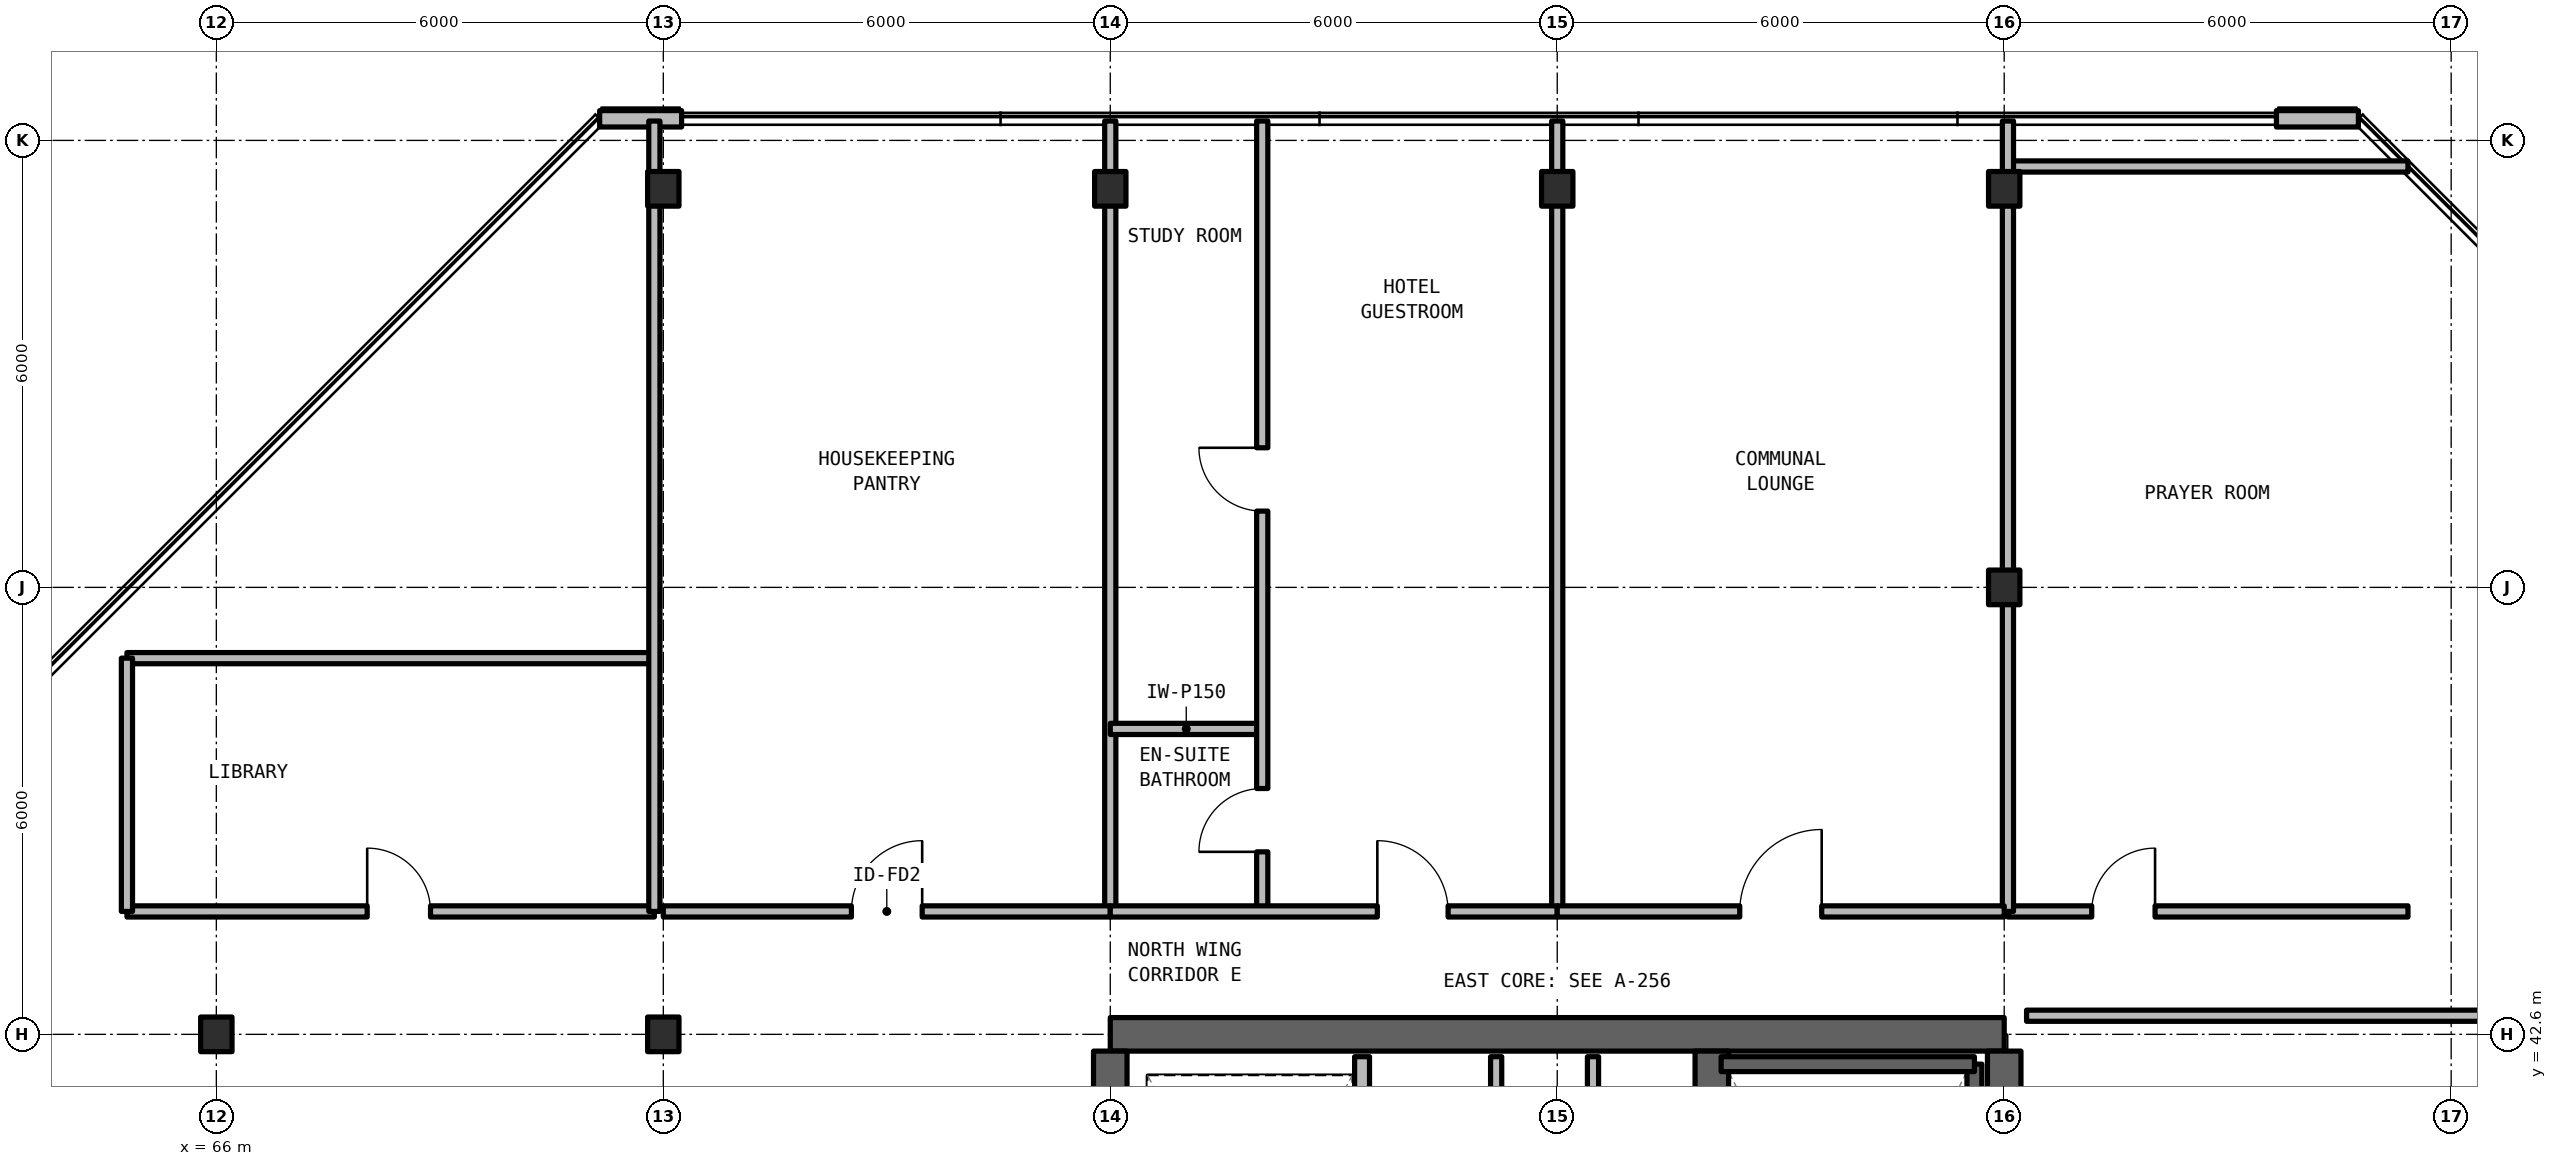
"""IFC4 building model, lengths in metres.
Left out: names, types, materials, properties, quantities, classifications, styles, units other than length and angle.
Written with IfcOpenShell. Run it as: python <this file> out.ifc"""

import sys

from ifc_helpers import new_model, si_unit, direction, frame, frame_2d, origin, origin_2d, place, context, subcontext, project, spatial, rectangle, i_section, extrude, element, fill, save


model = new_model("IFC4")
c1 = context("Model", 3, precision=1e-05, world=origin(), true_north=direction((0.0, 1.0)))
c2 = subcontext(c1, "Body", "Model", "MODEL_VIEW")
j1 = project(units=[si_unit("LENGTHUNIT", "METRE"), si_unit("PLANEANGLEUNIT", "RADIAN")], contexts=[c1])
p1 = place(None, origin())
s1 = spatial("IfcSite", under=j1, at=p1, CompositionType="ELEMENT")
p2 = place(p1, origin())
s2 = spatial("IfcBuilding", under=s1, at=p2, CompositionType="ELEMENT")
p3 = place(p2, frame((0.0, 0.0, 264.33)))
s3 = spatial("IfcBuildingStorey", under=s2, at=p3, CompositionType="ELEMENT", Elevation=264.33)
p4 = place(p3, frame((90.0, 42.6, 0.0), z_axis=(0.0, 0.0, 1.0), x_axis=(-1.0, 0.0, 0.0)))
e1 = element("IfcWall", 1, at=p4, inside=s3, PredefinedType="SHEAR", context=c2, shape_type="SweptSolid", body=[
    extrude(rectangle(XDim=12.0, YDim=0.45, at=frame_2d((6.0, 0.0))), origin(), (0.0, 0.0, 1.0), 3.63),
])
p5 = place(p3, frame((90.0, 24.825, 0.0), z_axis=(0.0, 0.0, 1.0), x_axis=(0.0, 1.0, 0.0)))
e2 = element("IfcWall", 2, at=p5, inside=s3, PredefinedType="SHEAR", context=c2, shape_type="SweptSolid", body=[
    extrude(rectangle(XDim=17.55, YDim=0.45, at=frame_2d((8.775, 0.0))), origin(), (0.0, 0.0, 1.0), 3.63),
])
p6 = place(p3, frame((78.0, 36.8, 0.0), z_axis=(0.0, 0.0, 1.0), x_axis=(0.0, 1.0, 0.0)))
e3 = element("IfcWall", 3, at=p6, inside=s3, PredefinedType="SHEAR", context=c2, shape_type="SweptSolid", body=[
    extrude(rectangle(XDim=5.575, YDim=0.45, at=frame_2d((2.788, 0.0))), origin(), (0.0, 0.0, 1.0), 3.63),
])
p7 = place(p3, frame((86.075, 24.825, 0.0), z_axis=(0.0, 0.0, 1.0), x_axis=(0.0, 1.0, 0.0)))
e4 = element("IfcWall", 4, at=p7, inside=s3, PredefinedType="SHEAR", context=c2, shape_type="SweptSolid", body=[
    extrude(rectangle(XDim=17.55, YDim=0.45, at=frame_2d((8.775, 0.0))), origin(), (0.0, 0.0, 1.0), 3.63),
])
p8 = place(p7, frame((0.425, 0.0, 0.0)))
e5 = element("IfcOpeningElement", 5, at=p8, cuts=e4, PredefinedType="OPENING", context=c2, shape_type="SweptSolid", body=[
    extrude(rectangle(XDim=1.15, YDim=2.15, at=frame_2d((0.575, 1.075))), frame((0.0, 0.235, 0.0), z_axis=(0.0, -1.0, 0.0), x_axis=(1.0, 0.0, 0.0)), (0.0, 0.0, 1.0), 0.47),
])
p9 = place(p7, frame((9.625, 0.0, 0.0)))
e6 = element("IfcOpeningElement", 6, at=p9, cuts=e4, PredefinedType="OPENING", context=c2, shape_type="SweptSolid", body=[
    extrude(rectangle(XDim=1.15, YDim=2.15, at=frame_2d((0.575, 1.075))), frame((0.0, 0.235, 0.0), z_axis=(0.0, -1.0, 0.0), x_axis=(1.0, 0.0, 0.0)), (0.0, 0.0, 1.0), 0.47),
])
for number, where, z_axis, x_axis in (
    (7, (66.0, 42.6, 0.0), (0.0, 0.0, 1.0), (1.0, 0.0, 0.0)),
    (8, (72.0, 42.6, 0.0), (0.0, 0.0, 1.0), (1.0, 0.0, 0.0)),
    (9, (90.0, 48.6, 0.0), (0.0, 0.0, 1.0), (1.0, 0.0, 0.0)),
    (10, (72.0, 53.95, 0.0), (0.0, 0.0, 1.0), (1.0, 0.0, 0.0)),
    (11, (78.0, 53.95, 0.0), (0.0, 0.0, 1.0), (1.0, 0.0, 0.0)),
    (12, (84.0, 53.95, 0.0), (0.0, 0.0, 1.0), (1.0, 0.0, 0.0)),
    (13, (90.0, 53.95, 0.0), (0.0, 0.0, 1.0), (1.0, 0.0, 0.0)),
):
    element("IfcColumn", number, at=place(p3, frame(where, z_axis=z_axis, x_axis=x_axis)), inside=s3, PredefinedType="COLUMN", context=c2, shape_type="SweptSolid", body=[
        extrude(i_section(OverallWidth=0.421, OverallDepth=0.465, WebThickness=0.045, FlangeThickness=0.07, FilletRadius=0.015, at=origin_2d()), origin(), (0.0, 0.0, 1.0), 3.63),
    ])
for number, where, z_axis, x_axis in (
    (14, (94.754, 54.89, 0.0), (0.0, 0.0, 1.0), (-1.0, 0.0, 0.0)),
    (15, (72.246, 54.89, 0.0), (0.0, 0.0, 1.0), (-1.0, 0.0, 0.0)),
):
    element("IfcWall", number, at=place(p3, frame(where, z_axis=z_axis, x_axis=x_axis)), inside=s3, PredefinedType="SOLIDWALL", context=c2, shape_type="SweptSolid", body=[
        extrude(rectangle(XDim=1.1, YDim=0.22, at=frame_2d((0.55, 0.0))), origin(), (0.0, 0.0, 1.0), 3.41),
    ])
p10 = place(p3, frame((84.48, 36.88, 0.0), z_axis=(0.0, 0.0, 1.0), x_axis=(0.0, 1.0, 0.0)))
e16 = element("IfcWall", 16, at=p10, inside=s3, PredefinedType="SOLIDWALL", context=c2, shape_type="SweptSolid", body=[
    extrude(rectangle(XDim=5.42, YDim=0.15, at=frame_2d((2.71, 0.0))), origin(), (0.0, 0.0, 1.0), 2.63),
])
p11 = place(p3, frame((83.18, 36.88, 0.0), z_axis=(0.0, 0.0, 1.0), x_axis=(0.0, 1.0, 0.0)))
e17 = element("IfcWall", 17, at=p11, inside=s3, PredefinedType="SOLIDWALL", context=c2, shape_type="SweptSolid", body=[
    extrude(rectangle(XDim=5.42, YDim=0.15, at=frame_2d((2.71, 0.0))), origin(), (0.0, 0.0, 1.0), 2.63),
])
p12 = place(p11, frame((2.1, 0.0, 0.0)))
e18 = element("IfcOpeningElement", 18, at=p12, cuts=e17, PredefinedType="OPENING", context=c2, shape_type="SweptSolid", body=[
    extrude(rectangle(XDim=0.95, YDim=2.15, at=frame_2d((0.475, 1.075))), frame((0.0, 0.085, 0.0), z_axis=(0.0, -1.0, 0.0), x_axis=(1.0, 0.0, 0.0)), (0.0, 0.0, 1.0), 0.17),
])
p13 = place(p3, frame((81.38, 36.88, 0.0), z_axis=(0.0, 0.0, 1.0), x_axis=(0.0, 1.0, 0.0)))
e19 = element("IfcWall", 19, at=p13, inside=s3, PredefinedType="SOLIDWALL", context=c2, shape_type="SweptSolid", body=[
    extrude(rectangle(XDim=5.42, YDim=0.2, at=frame_2d((2.71, 0.0))), origin(), (0.0, 0.0, 1.0), 2.63),
])
p14 = place(p13, frame((0.8, 0.0, 0.0)))
e20 = element("IfcOpeningElement", 20, at=p14, cuts=e19, PredefinedType="OPENING", context=c2, shape_type="SweptSolid", body=[
    extrude(rectangle(XDim=1.1, YDim=2.2, at=frame_2d((0.55, 1.1))), frame((0.0, 0.11, 0.0), z_axis=(0.0, -1.0, 0.0), x_axis=(1.0, 0.0, 0.0)), (0.0, 0.0, 1.0), 0.22),
])
p15 = place(p13, frame((3.3, 0.0, 0.0)))
e21 = element("IfcOpeningElement", 21, at=p15, cuts=e19, PredefinedType="OPENING", context=c2, shape_type="SweptSolid", body=[
    extrude(rectangle(XDim=1.1, YDim=2.2, at=frame_2d((0.55, 1.1))), frame((0.0, 0.11, 0.0), z_axis=(0.0, -1.0, 0.0), x_axis=(1.0, 0.0, 0.0)), (0.0, 0.0, 1.0), 0.22),
])
p16 = place(p3, frame((64.8, 44.25, 0.0), z_axis=(0.0, 0.0, 1.0), x_axis=(1.0, 0.0, 0.0)))
e22 = element("IfcWall", 22, at=p16, inside=s3, PredefinedType="SOLIDWALL", context=c2, shape_type="SweptSolid", body=[
    extrude(rectangle(XDim=7.08, YDim=0.15, at=frame_2d((3.54, 0.0))), origin(), (0.0, 0.0, 1.0), 2.63),
])
p17 = place(p16, frame((3.225, 0.0, 0.0)))
e23 = element("IfcOpeningElement", 23, at=p17, cuts=e22, PredefinedType="OPENING", context=c2, shape_type="SweptSolid", body=[
    extrude(rectangle(XDim=0.85, YDim=2.1, at=frame_2d((0.425, 1.05))), frame((0.0, 0.085, 0.0), z_axis=(0.0, -1.0, 0.0), x_axis=(1.0, 0.0, 0.0)), (0.0, 0.0, 1.0), 0.17),
])
p18 = place(p3, frame((64.8, 47.65, 0.0), z_axis=(0.0, 0.0, 1.0), x_axis=(1.0, 0.0, 0.0)))
e24 = element("IfcWall", 24, at=p18, inside=s3, PredefinedType="SOLIDWALL", context=c2, shape_type="SweptSolid", body=[
    extrude(rectangle(XDim=7.08, YDim=0.15, at=frame_2d((3.54, 0.0))), origin(), (0.0, 0.0, 1.0), 2.63),
])
p19 = place(p3, frame((64.8, 44.25, 0.0), z_axis=(0.0, 0.0, 1.0), x_axis=(0.0, 1.0, 0.0)))
e25 = element("IfcWall", 25, at=p19, inside=s3, PredefinedType="SOLIDWALL", context=c2, shape_type="SweptSolid", body=[
    extrude(rectangle(XDim=3.4, YDim=0.15, at=frame_2d((1.7, 0.0))), origin(), (0.0, 0.0, 1.0), 2.63),
])
p20 = place(p3, frame((71.88, 44.25, 0.0), z_axis=(0.0, 0.0, 1.0), x_axis=(0.0, 1.0, 0.0)))
e26 = element("IfcWall", 26, at=p20, inside=s3, PredefinedType="SOLIDWALL", context=c2, shape_type="SweptSolid", body=[
    extrude(rectangle(XDim=10.61, YDim=0.15, at=frame_2d((5.305, 0.0))), origin(), (0.0, 0.0, 1.0), 2.63),
])
p21 = place(p3, frame((90.3, 42.85, 0.0), z_axis=(0.0, 0.0, 1.0), x_axis=(1.0, 0.0, 0.0)))
e27 = element("IfcWall", 27, at=p21, inside=s3, PredefinedType="SOLIDWALL", context=c2, shape_type="SweptSolid", body=[
    extrude(rectangle(XDim=8.52, YDim=0.15, at=frame_2d((4.26, 0.0))), origin(), (0.0, 0.0, 1.0), 2.63),
])
p22 = place(p3, frame((90.05, 44.25, 0.0), z_axis=(0.0, 0.0, 1.0), x_axis=(1.0, 0.0, 0.0)))
e28 = element("IfcWall", 28, at=p22, inside=s3, PredefinedType="SOLIDWALL", context=c2, shape_type="SweptSolid", body=[
    extrude(rectangle(XDim=5.37, YDim=0.15, at=frame_2d((2.685, 0.0))), origin(), (0.0, 0.0, 1.0), 2.63),
])
p23 = place(p22, frame((1.125, 0.0, 0.0)))
e29 = element("IfcOpeningElement", 29, at=p23, cuts=e28, PredefinedType="OPENING", context=c2, shape_type="SweptSolid", body=[
    extrude(rectangle(XDim=0.85, YDim=2.1, at=frame_2d((0.425, 1.05))), frame((0.0, 0.085, 0.0), z_axis=(0.0, -1.0, 0.0), x_axis=(1.0, 0.0, 0.0)), (0.0, 0.0, 1.0), 0.17),
])
p24 = place(p3, frame((90.05, 54.25, 0.0), z_axis=(0.0, 0.0, 1.0), x_axis=(1.0, 0.0, 0.0)))
e30 = element("IfcWall", 30, at=p24, inside=s3, PredefinedType="SOLIDWALL", context=c2, shape_type="SweptSolid", body=[
    extrude(rectangle(XDim=5.37, YDim=0.15, at=frame_2d((2.685, 0.0))), origin(), (0.0, 0.0, 1.0), 2.63),
])
for number, where, z_axis, x_axis in (
    (31, (90.05, 44.25, 0.0), (0.0, 0.0, 1.0), (0.0, 1.0, 0.0)),
    (32, (78.0, 44.25, 0.0), (0.0, 0.0, 1.0), (0.0, 1.0, 0.0)),
):
    element("IfcWall", number, at=place(p3, frame(where, z_axis=z_axis, x_axis=x_axis)), inside=s3, PredefinedType="SOLIDWALL", context=c2, shape_type="SweptSolid", body=[
        extrude(rectangle(XDim=10.61, YDim=0.15, at=frame_2d((5.305, 0.0))), origin(), (0.0, 0.0, 1.0), 2.63),
    ])
p25 = place(p3, frame((72.0, 44.25, 0.0), z_axis=(0.0, 0.0, 1.0), x_axis=(1.0, 0.0, 0.0)))
e33 = element("IfcWall", 33, at=p25, inside=s3, PredefinedType="SOLIDWALL", context=c2, shape_type="SweptSolid", body=[
    extrude(rectangle(XDim=6.0, YDim=0.15, at=frame_2d((3.0, 0.0))), origin(), (0.0, 0.0, 1.0), 2.63),
])
p26 = place(p25, frame((2.525, 0.0, 0.0)))
e34 = element("IfcOpeningElement", 34, at=p26, cuts=e33, PredefinedType="OPENING", context=c2, shape_type="SweptSolid", body=[
    extrude(rectangle(XDim=0.95, YDim=2.15, at=frame_2d((0.475, 1.075))), frame((0.0, 0.085, 0.0), z_axis=(0.0, -1.0, 0.0), x_axis=(1.0, 0.0, 0.0)), (0.0, 0.0, 1.0), 0.17),
])
p27 = place(p3, frame((84.0, 44.25, 0.0), z_axis=(0.0, 0.0, 1.0), x_axis=(0.0, 1.0, 0.0)))
e35 = element("IfcWall", 35, at=p27, inside=s3, PredefinedType="SOLIDWALL", context=c2, shape_type="SweptSolid", body=[
    extrude(rectangle(XDim=10.61, YDim=0.15, at=frame_2d((5.305, 0.0))), origin(), (0.0, 0.0, 1.0), 2.63),
])
p28 = place(p3, frame((78.0, 46.7, 0.0), z_axis=(0.0, 0.0, 1.0), x_axis=(1.0, 0.0, 0.0)))
e36 = element("IfcWall", 36, at=p28, inside=s3, PredefinedType="PARTITIONING", context=c2, shape_type="SweptSolid", body=[
    extrude(rectangle(XDim=2.04, YDim=0.15, at=frame_2d((1.02, 0.0))), origin(), (0.0, 0.0, 1.0), 2.63),
])
p29 = place(p3, frame((80.04, 44.25, 0.0), z_axis=(0.0, 0.0, 1.0), x_axis=(0.0, 1.0, 0.0)))
e37 = element("IfcWall", 37, at=p29, inside=s3, PredefinedType="PARTITIONING", context=c2, shape_type="SweptSolid", body=[
    extrude(rectangle(XDim=10.61, YDim=0.15, at=frame_2d((5.305, 0.0))), origin(), (0.0, 0.0, 1.0), 2.63),
])
p30 = place(p29, frame((0.8, 0.0, 0.0)))
e38 = element("IfcOpeningElement", 38, at=p30, cuts=e37, PredefinedType="OPENING", context=c2, shape_type="SweptSolid", body=[
    extrude(rectangle(XDim=0.85, YDim=2.1, at=frame_2d((0.425, 1.05))), frame((0.0, 0.085, 0.0), z_axis=(0.0, -1.0, 0.0), x_axis=(1.0, 0.0, 0.0)), (0.0, 0.0, 1.0), 0.17),
])
p31 = place(p29, frame((5.374, 0.0, 0.0)))
e39 = element("IfcOpeningElement", 39, at=p31, cuts=e37, PredefinedType="OPENING", context=c2, shape_type="SweptSolid", body=[
    extrude(rectangle(XDim=0.85, YDim=2.1, at=frame_2d((0.425, 1.05))), frame((0.0, 0.085, 0.0), z_axis=(0.0, -1.0, 0.0), x_axis=(1.0, 0.0, 0.0)), (0.0, 0.0, 1.0), 0.17),
])
p32 = place(p3, frame((78.0, 44.25, 0.0), z_axis=(0.0, 0.0, 1.0), x_axis=(1.0, 0.0, 0.0)))
e40 = element("IfcWall", 40, at=p32, inside=s3, PredefinedType="SOLIDWALL", context=c2, shape_type="SweptSolid", body=[
    extrude(rectangle(XDim=6.0, YDim=0.15, at=frame_2d((3.0, 0.0))), origin(), (0.0, 0.0, 1.0), 2.63),
])
p33 = place(p32, frame((3.585, 0.0, 0.0)))
e41 = element("IfcOpeningElement", 41, at=p33, cuts=e40, PredefinedType="OPENING", context=c2, shape_type="SweptSolid", body=[
    extrude(rectangle(XDim=0.95, YDim=2.15, at=frame_2d((0.475, 1.075))), frame((0.0, 0.085, 0.0), z_axis=(0.0, -1.0, 0.0), x_axis=(1.0, 0.0, 0.0)), (0.0, 0.0, 1.0), 0.17),
])
p34 = place(p3, frame((84.0, 44.25, 0.0), z_axis=(0.0, 0.0, 1.0), x_axis=(1.0, 0.0, 0.0)))
e42 = element("IfcWall", 42, at=p34, inside=s3, PredefinedType="SOLIDWALL", context=c2, shape_type="SweptSolid", body=[
    extrude(rectangle(XDim=6.0, YDim=0.15, at=frame_2d((3.0, 0.0))), origin(), (0.0, 0.0, 1.0), 2.63),
])
p35 = place(p34, frame((2.45, 0.0, 0.0)))
e43 = element("IfcOpeningElement", 43, at=p35, cuts=e42, PredefinedType="OPENING", context=c2, shape_type="SweptSolid", body=[
    extrude(rectangle(XDim=1.1, YDim=2.15, at=frame_2d((0.55, 1.075))), frame((0.0, 0.085, 0.0), z_axis=(0.0, -1.0, 0.0), x_axis=(1.0, 0.0, 0.0)), (0.0, 0.0, 1.0), 0.17),
])
p36 = place(p3, frame((89.6, 34.2, 0.0), z_axis=(0.0, 0.0, 1.0), x_axis=(0.0, 1.0, 0.0)))
e44 = element("IfcWall", 44, at=p36, inside=s3, PredefinedType="SOLIDWALL", context=c2, shape_type="SweptSolid", body=[
    extrude(rectangle(XDim=8.0, YDim=0.2, at=frame_2d((4.0, 0.0))), origin(), (0.0, 0.0, 1.0), 3.63),
])
p37 = place(p3, frame((89.6, 42.2, 0.0), z_axis=(0.0, 0.0, 1.0), x_axis=(-1.0, 0.0, 0.0)))
e45 = element("IfcWall", 45, at=p37, inside=s3, PredefinedType="SOLIDWALL", context=c2, shape_type="SweptSolid", body=[
    extrude(rectangle(XDim=3.4, YDim=0.2, at=frame_2d((1.7, 0.0))), origin(), (0.0, 0.0, 1.0), 3.63),
])
p38 = place(p17, origin())
e46 = element("IfcDoor", 46, at=p38, inside=s3, OperationType="SINGLE_SWING_LEFT", PredefinedType="DOOR", context=c2, shape_type="SweptSolid", body=[
    extrude(rectangle(XDim=0.85, YDim=2.1, at=frame_2d((0.425, 1.05))), frame((0.0, 0.025, 0.0), z_axis=(0.0, -1.0, 0.0), x_axis=(1.0, 0.0, 0.0)), (0.0, 0.0, 1.0), 0.05),
])
fill(e23, e46)
p39 = place(p23, origin())
e47 = element("IfcDoor", 47, at=p39, inside=s3, OperationType="SINGLE_SWING_RIGHT", PredefinedType="DOOR", context=c2, shape_type="SweptSolid", body=[
    extrude(rectangle(XDim=0.85, YDim=2.1, at=frame_2d((0.425, 1.05))), frame((0.0, 0.025, 0.0), z_axis=(0.0, -1.0, 0.0), x_axis=(1.0, 0.0, 0.0)), (0.0, 0.0, 1.0), 0.05),
])
fill(e29, e47)
p40 = place(p26, origin())
e48 = element("IfcDoor", 48, at=p40, inside=s3, OperationType="SINGLE_SWING_RIGHT", PredefinedType="DOOR", context=c2, shape_type="SweptSolid", body=[
    extrude(rectangle(XDim=0.95, YDim=2.15, at=frame_2d((0.475, 1.075))), frame((0.0, 0.025, 0.0), z_axis=(0.0, -1.0, 0.0), x_axis=(1.0, 0.0, 0.0)), (0.0, 0.0, 1.0), 0.05),
])
fill(e34, e48)
p41 = place(p30, origin())
e49 = element("IfcDoor", 49, at=p41, inside=s3, OperationType="SINGLE_SWING_LEFT", PredefinedType="DOOR", context=c2, shape_type="SweptSolid", body=[
    extrude(rectangle(XDim=0.85, YDim=2.1, at=frame_2d((0.425, 1.05))), frame((0.0, 0.025, 0.0), z_axis=(0.0, -1.0, 0.0), x_axis=(1.0, 0.0, 0.0)), (0.0, 0.0, 1.0), 0.05),
])
fill(e38, e49)
p42 = place(p31, origin())
e50 = element("IfcDoor", 50, at=p42, inside=s3, OperationType="SINGLE_SWING_RIGHT", PredefinedType="DOOR", context=c2, shape_type="SweptSolid", body=[
    extrude(rectangle(XDim=0.85, YDim=2.1, at=frame_2d((0.425, 1.05))), frame((0.0, 0.025, 0.0), z_axis=(0.0, -1.0, 0.0), x_axis=(1.0, 0.0, 0.0)), (0.0, 0.0, 1.0), 0.05),
])
fill(e39, e50)
p43 = place(p33, origin())
e51 = element("IfcDoor", 51, at=p43, inside=s3, OperationType="SINGLE_SWING_LEFT", PredefinedType="DOOR", context=c2, shape_type="SweptSolid", body=[
    extrude(rectangle(XDim=0.95, YDim=2.15, at=frame_2d((0.475, 1.075))), frame((0.0, 0.025, 0.0), z_axis=(0.0, -1.0, 0.0), x_axis=(1.0, 0.0, 0.0)), (0.0, 0.0, 1.0), 0.05),
])
fill(e41, e51)
p44 = place(p35, origin())
e52 = element("IfcDoor", 52, at=p44, inside=s3, OperationType="SINGLE_SWING_RIGHT", PredefinedType="DOOR", context=c2, shape_type="SweptSolid", body=[
    extrude(rectangle(XDim=1.1, YDim=2.15, at=frame_2d((0.55, 1.075))), frame((0.0, 0.025, 0.0), z_axis=(0.0, -1.0, 0.0), x_axis=(1.0, 0.0, 0.0)), (0.0, 0.0, 1.0), 0.05),
])
fill(e43, e52)
save(model, sys.argv[1])
